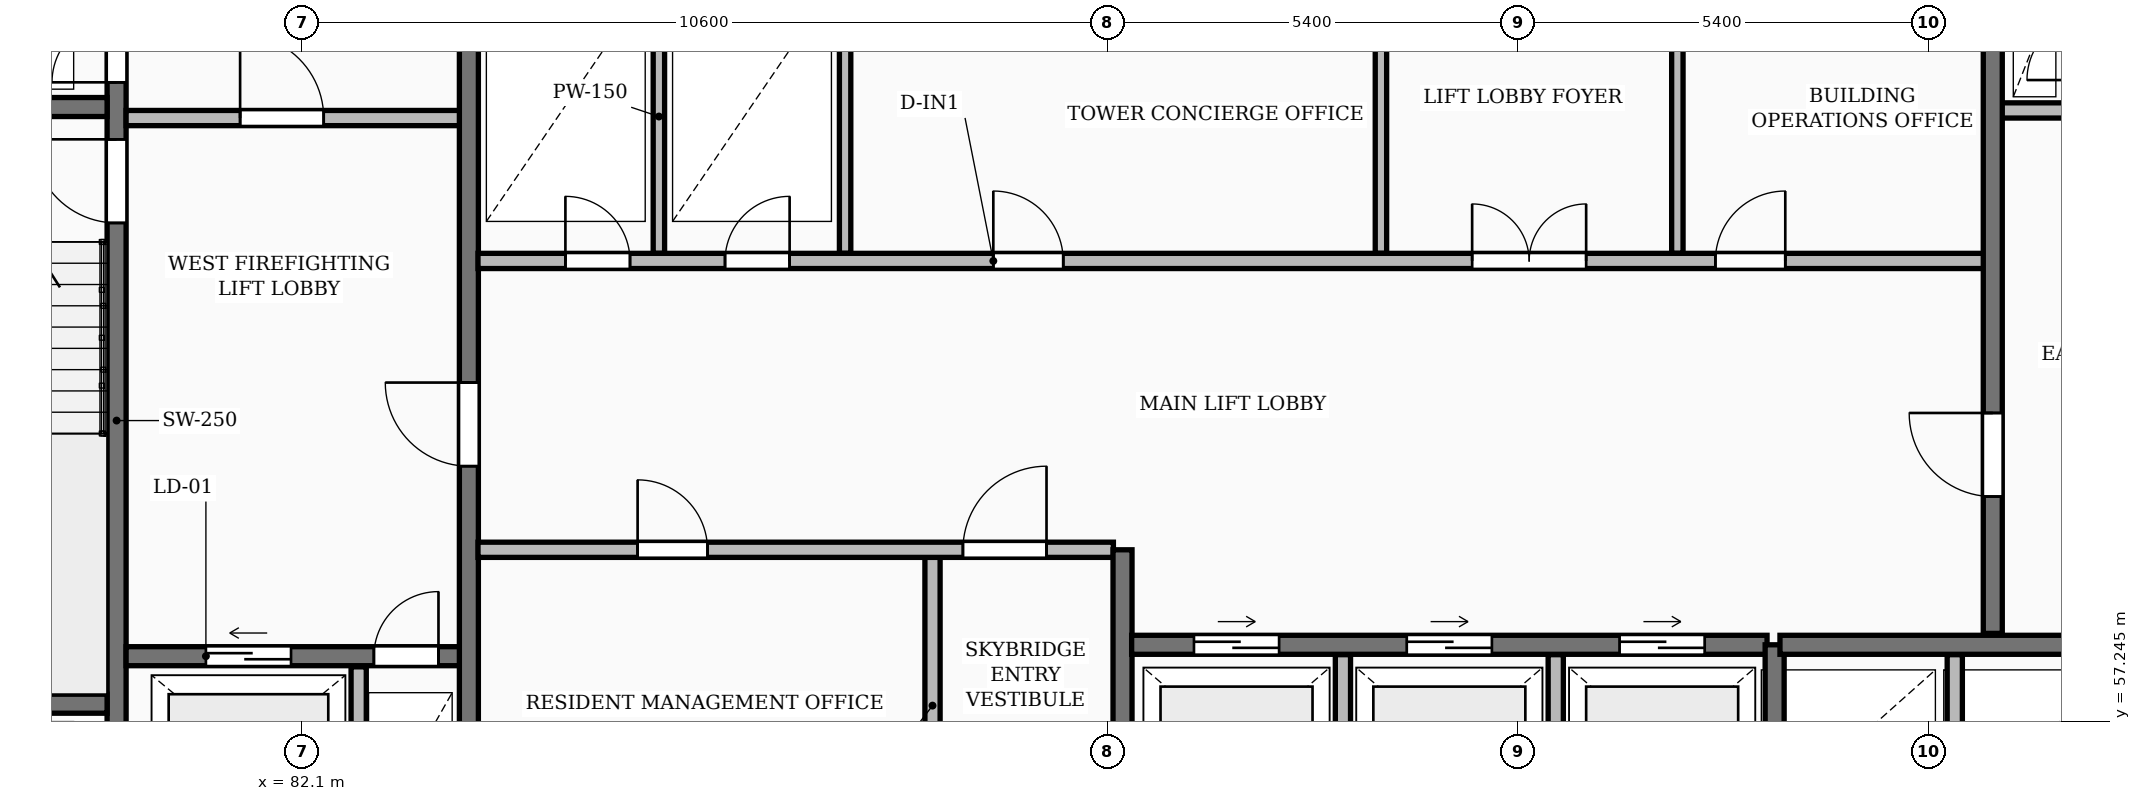
"""IFC4 building model, lengths in metres.
Left out: names, types, materials, properties, quantities, classifications, styles, units other than length and angle.
Written with IfcOpenShell. Run it as: python <this file> out.ifc"""

import sys

from ifc_helpers import new_model, si_unit, direction, frame, frame_2d, origin, place, context, subcontext, project, spatial, rectangle, extrude, element, fill, save


model = new_model("IFC4")
c1 = context("Model", 3, precision=1e-05, world=origin(), true_north=direction((0.0, 1.0)))
c2 = subcontext(c1, "Body", "Model", "MODEL_VIEW")
j1 = project(units=[si_unit("LENGTHUNIT", "METRE"), si_unit("PLANEANGLEUNIT", "RADIAN")], contexts=[c1])
p1 = place(None, origin())
s1 = spatial("IfcSite", under=j1, at=p1, CompositionType="ELEMENT")
p2 = place(p1, origin())
s2 = spatial("IfcBuilding", under=s1, at=p2, CompositionType="ELEMENT")
p3 = place(p2, frame((0.0, 0.0, 146.5)))
s3 = spatial("IfcBuildingStorey", under=s2, at=p3, CompositionType="ELEMENT", Elevation=146.5)
p4 = place(p3, frame((79.665, 55.4, 0.0), z_axis=(0.0, 0.0, 1.0), x_axis=(0.0, 1.0, 0.0)))
e1 = element("IfcWall", 1, at=p4, inside=s3, PredefinedType="SHEAR", context=c2, shape_type="SweptSolid", body=[
    extrude(rectangle(XDim=11.6, YDim=0.25, at=frame_2d((5.8, 0.0))), origin(), (0.0, 0.0, 1.0), 3.6),
])
p5 = place(p4, frame((0.55, 0.0, 0.0)))
e2 = element("IfcOpeningElement", 2, at=p5, cuts=e1, PredefinedType="OPENING", context=c2, shape_type="SweptSolid", body=[
    extrude(rectangle(XDim=0.85, YDim=2.05, at=frame_2d((0.425, 1.025))), frame((0.0, 0.135, 0.0), z_axis=(0.0, -1.0, 0.0), x_axis=(1.0, 0.0, 0.0)), (0.0, 0.0, 1.0), 0.27),
])
p6 = place(p4, frame((8.4, 0.0, 0.0)))
e3 = element("IfcOpeningElement", 3, at=p6, cuts=e1, PredefinedType="OPENING", context=c2, shape_type="SweptSolid", body=[
    extrude(rectangle(XDim=1.1, YDim=2.1, at=frame_2d((0.55, 1.05))), frame((0.0, 0.135, 0.0), z_axis=(0.0, -1.0, 0.0), x_axis=(1.0, 0.0, 0.0)), (0.0, 0.0, 1.0), 0.27),
])
p7 = place(p4, frame((10.25, 0.0, 0.0)))
e4 = element("IfcOpeningElement", 4, at=p7, cuts=e1, PredefinedType="OPENING", context=c2, shape_type="SweptSolid", body=[
    extrude(rectangle(XDim=0.85, YDim=2.05, at=frame_2d((0.425, 1.025))), frame((0.0, 0.135, 0.0), z_axis=(0.0, -1.0, 0.0), x_axis=(1.0, 0.0, 0.0)), (0.0, 0.0, 1.0), 0.27),
])
for number, where, z_axis, x_axis in (
    (5, (76.3, 57.475, 0.0), (0.0, 0.0, 1.0), (1.0, 0.0, 0.0)),
    (6, (76.3, 65.325, 0.0), (0.0, 0.0, 1.0), (1.0, 0.0, 0.0)),
):
    element("IfcWall", number, at=place(p3, frame(where, z_axis=z_axis, x_axis=x_axis)), inside=s3, PredefinedType="SHEAR", context=c2, shape_type="SweptSolid", body=[
        extrude(rectangle(XDim=3.24, YDim=0.25, at=frame_2d((1.62, 0.0))), origin(), (0.0, 0.0, 1.0), 3.6),
    ])
p8 = place(p3, frame((79.79, 58.1, 0.0), z_axis=(0.0, 0.0, 1.0), x_axis=(1.0, 0.0, 0.0)))
e7 = element("IfcWall", 7, at=p8, inside=s3, PredefinedType="SHEAR", context=c2, shape_type="SweptSolid", body=[
    extrude(rectangle(XDim=4.39, YDim=0.25, at=frame_2d((2.195, 0.0))), origin(), (0.0, 0.0, 1.0), 3.6),
])
p9 = place(p8, frame((1.05, 0.0, 0.0)))
e8 = element("IfcOpeningElement", 8, at=p9, cuts=e7, PredefinedType="OPENING", context=c2, shape_type="SweptSolid", body=[
    extrude(rectangle(XDim=1.12, YDim=2.12, at=frame_2d((0.56, 1.06))), frame((0.0, 0.135, 0.0), z_axis=(0.0, -1.0, 0.0), x_axis=(1.0, 0.0, 0.0)), (0.0, 0.0, 1.0), 0.27),
])
p10 = place(p8, frame((3.26, 0.0, 0.0)))
e9 = element("IfcOpeningElement", 9, at=p10, cuts=e7, PredefinedType="OPENING", context=c2, shape_type="SweptSolid", body=[
    extrude(rectangle(XDim=0.85, YDim=2.05, at=frame_2d((0.425, 1.025))), frame((0.0, 0.135, 0.0), z_axis=(0.0, -1.0, 0.0), x_axis=(1.0, 0.0, 0.0)), (0.0, 0.0, 1.0), 0.27),
])
p11 = place(p3, frame((82.85, 55.4, 0.0), z_axis=(0.0, 0.0, 1.0), x_axis=(0.0, 1.0, 0.0)))
e10 = element("IfcWall", 10, at=p11, inside=s3, PredefinedType="PARTITIONING", context=c2, shape_type="SweptSolid", body=[
    extrude(rectangle(XDim=2.56, YDim=0.2, at=frame_2d((1.28, 0.0))), origin(), (0.0, 0.0, 1.0), 3.31),
])
p12 = place(p3, frame((79.79, 65.18, 0.0), z_axis=(0.0, 0.0, 1.0), x_axis=(1.0, 0.0, 0.0)))
e11 = element("IfcWall", 11, at=p12, inside=s3, PredefinedType="PARTITIONING", context=c2, shape_type="SweptSolid", body=[
    extrude(rectangle(XDim=4.39, YDim=0.2, at=frame_2d((2.195, 0.0))), origin(), (0.0, 0.0, 1.0), 3.31),
])
p13 = place(p12, frame((1.5, 0.0, 0.0)))
e12 = element("IfcOpeningElement", 12, at=p13, cuts=e11, PredefinedType="OPENING", context=c2, shape_type="SweptSolid", body=[
    extrude(rectangle(XDim=1.1, YDim=2.1, at=frame_2d((0.55, 1.05))), frame((0.0, 0.11, 0.0), z_axis=(0.0, -1.0, 0.0), x_axis=(1.0, 0.0, 0.0)), (0.0, 0.0, 1.0), 0.22),
])
p14 = place(p3, frame((84.3, 55.4, 0.0), z_axis=(0.0, 0.0, 1.0), x_axis=(0.0, 1.0, 0.0)))
e13 = element("IfcWall", 13, at=p14, inside=s3, PredefinedType="SHEAR", context=c2, shape_type="SweptSolid", body=[
    extrude(rectangle(XDim=11.6, YDim=0.25, at=frame_2d((5.8, 0.0))), origin(), (0.0, 0.0, 1.0), 3.6),
])
p15 = place(p14, frame((5.2, 0.0, 0.0)))
e14 = element("IfcOpeningElement", 14, at=p15, cuts=e13, PredefinedType="OPENING", context=c2, shape_type="SweptSolid", body=[
    extrude(rectangle(XDim=1.1, YDim=2.1, at=frame_2d((0.55, 1.05))), frame((0.0, 0.135, 0.0), z_axis=(0.0, -1.0, 0.0), x_axis=(1.0, 0.0, 0.0)), (0.0, 0.0, 1.0), 0.27),
])
p16 = place(p3, frame((90.4, 55.4, 0.0), z_axis=(0.0, 0.0, 1.0), x_axis=(0.0, 1.0, 0.0)))
e15 = element("IfcWall", 15, at=p16, inside=s3, PredefinedType="PARTITIONING", context=c2, shape_type="SweptSolid", body=[
    extrude(rectangle(XDim=4.1, YDim=0.2, at=frame_2d((2.05, 0.0))), origin(), (0.0, 0.0, 1.0), 3.31),
])
p17 = place(p3, frame((84.42, 59.5, 0.0), z_axis=(0.0, 0.0, 1.0), x_axis=(1.0, 0.0, 0.0)))
e16 = element("IfcWall", 16, at=p17, inside=s3, PredefinedType="PARTITIONING", context=c2, shape_type="SweptSolid", body=[
    extrude(rectangle(XDim=8.36, YDim=0.2, at=frame_2d((4.18, 0.0))), origin(), (0.0, 0.0, 1.0), 3.31),
])
p18 = place(p17, frame((2.1, 0.0, 0.0)))
e17 = element("IfcOpeningElement", 17, at=p18, cuts=e16, PredefinedType="OPENING", context=c2, shape_type="SweptSolid", body=[
    extrude(rectangle(XDim=0.92, YDim=2.08, at=frame_2d((0.46, 1.04))), frame((0.0, 0.11, 0.0), z_axis=(0.0, -1.0, 0.0), x_axis=(1.0, 0.0, 0.0)), (0.0, 0.0, 1.0), 0.22),
])
p19 = place(p17, frame((6.38, 0.0, 0.0)))
e18 = element("IfcOpeningElement", 18, at=p19, cuts=e16, PredefinedType="OPENING", context=c2, shape_type="SweptSolid", body=[
    extrude(rectangle(XDim=1.1, YDim=2.1, at=frame_2d((0.55, 1.05))), frame((0.0, 0.11, 0.0), z_axis=(0.0, -1.0, 0.0), x_axis=(1.0, 0.0, 0.0)), (0.0, 0.0, 1.0), 0.22),
])
p20 = place(p3, frame((92.9, 55.4, 0.0), z_axis=(0.0, 0.0, 1.0), x_axis=(0.0, 1.0, 0.0)))
e19 = element("IfcWall", 19, at=p20, inside=s3, PredefinedType="SHEAR", context=c2, shape_type="SweptSolid", body=[
    extrude(rectangle(XDim=4.1, YDim=0.25, at=frame_2d((2.05, 0.0))), origin(), (0.0, 0.0, 1.0), 3.6),
])
for number, where, z_axis, x_axis in (
    (20, (95.8, 55.4, 0.0), (0.0, 0.0, 1.0), (0.0, 1.0, 0.0)),
    (21, (98.6, 55.4, 0.0), (0.0, 0.0, 1.0), (0.0, 1.0, 0.0)),
):
    element("IfcWall", number, at=place(p3, frame(where, z_axis=z_axis, x_axis=x_axis)), inside=s3, PredefinedType="PARTITIONING", context=c2, shape_type="SweptSolid", body=[
        extrude(rectangle(XDim=2.72, YDim=0.2, at=frame_2d((1.36, 0.0))), origin(), (0.0, 0.0, 1.0), 3.31),
    ])
p21 = place(p3, frame((93.02, 58.25, 0.0), z_axis=(0.0, 0.0, 1.0), x_axis=(1.0, 0.0, 0.0)))
e22 = element("IfcWall", 22, at=p21, inside=s3, PredefinedType="SHEAR", context=c2, shape_type="SweptSolid", body=[
    extrude(rectangle(XDim=8.36, YDim=0.25, at=frame_2d((4.18, 0.0))), origin(), (0.0, 0.0, 1.0), 3.6),
])
p22 = place(p21, frame((0.82, 0.0, 0.0)))
e23 = element("IfcOpeningElement", 23, at=p22, cuts=e22, PredefinedType="OPENING", context=c2, shape_type="SweptSolid", body=[
    extrude(rectangle(XDim=1.12, YDim=2.12, at=frame_2d((0.56, 1.06))), frame((0.0, 0.135, 0.0), z_axis=(0.0, -1.0, 0.0), x_axis=(1.0, 0.0, 0.0)), (0.0, 0.0, 1.0), 0.27),
])
p23 = place(p21, frame((3.62, 0.0, 0.0)))
e24 = element("IfcOpeningElement", 24, at=p23, cuts=e22, PredefinedType="OPENING", context=c2, shape_type="SweptSolid", body=[
    extrude(rectangle(XDim=1.12, YDim=2.12, at=frame_2d((0.56, 1.06))), frame((0.0, 0.135, 0.0), z_axis=(0.0, -1.0, 0.0), x_axis=(1.0, 0.0, 0.0)), (0.0, 0.0, 1.0), 0.27),
])
p24 = place(p21, frame((6.42, 0.0, 0.0)))
e25 = element("IfcOpeningElement", 25, at=p24, cuts=e22, PredefinedType="OPENING", context=c2, shape_type="SweptSolid", body=[
    extrude(rectangle(XDim=1.12, YDim=2.12, at=frame_2d((0.56, 1.06))), frame((0.0, 0.135, 0.0), z_axis=(0.0, -1.0, 0.0), x_axis=(1.0, 0.0, 0.0)), (0.0, 0.0, 1.0), 0.27),
])
p25 = place(p3, frame((101.48, 55.4, 0.0), z_axis=(0.0, 0.0, 1.0), x_axis=(0.0, 1.0, 0.0)))
e26 = element("IfcWall", 26, at=p25, inside=s3, PredefinedType="SHEAR", context=c2, shape_type="SweptSolid", body=[
    extrude(rectangle(XDim=2.85, YDim=0.25, at=frame_2d((1.425, 0.0))), origin(), (0.0, 0.0, 1.0), 3.6),
])
p26 = place(p3, frame((103.85, 55.4, 0.0), z_axis=(0.0, 0.0, 1.0), x_axis=(0.0, 1.0, 0.0)))
e27 = element("IfcWall", 27, at=p26, inside=s3, PredefinedType="PARTITIONING", context=c2, shape_type="SweptSolid", body=[
    extrude(rectangle(XDim=2.72, YDim=0.2, at=frame_2d((1.36, 0.0))), origin(), (0.0, 0.0, 1.0), 3.31),
])
p27 = place(p3, frame((101.55, 58.25, 0.0), z_axis=(0.0, 0.0, 1.0), x_axis=(1.0, 0.0, 0.0)))
e28 = element("IfcWall", 28, at=p27, inside=s3, PredefinedType="SHEAR", context=c2, shape_type="SweptSolid", body=[
    extrude(rectangle(XDim=4.6, YDim=0.25, at=frame_2d((2.3, 0.0))), origin(), (0.0, 0.0, 1.0), 3.6),
])
for number, where, z_axis, x_axis in (
    (29, (86.8, 63.4, 0.0), (0.0, 0.0, 1.0), (0.0, 1.0, 0.0)),
    (30, (89.25, 63.4, 0.0), (0.0, 0.0, 1.0), (0.0, 1.0, 0.0)),
    (31, (96.3, 63.4, 0.0), (0.0, 0.0, 1.0), (0.0, 1.0, 0.0)),
    (32, (100.2, 63.4, 0.0), (0.0, 0.0, 1.0), (0.0, 1.0, 0.0)),
):
    element("IfcWall", number, at=place(p3, frame(where, z_axis=z_axis, x_axis=x_axis)), inside=s3, PredefinedType="PARTITIONING", context=c2, shape_type="SweptSolid", body=[
        extrude(rectangle(XDim=3.6, YDim=0.15, at=frame_2d((1.8, 0.0))), origin(), (0.0, 0.0, 1.0), 3.31),
    ])
p28 = place(p3, frame((84.42, 63.3, 0.0), z_axis=(0.0, 0.0, 1.0), x_axis=(1.0, 0.0, 0.0)))
e33 = element("IfcWall", 33, at=p28, inside=s3, PredefinedType="PARTITIONING", context=c2, shape_type="SweptSolid", body=[
    extrude(rectangle(XDim=19.83, YDim=0.2, at=frame_2d((9.915, 0.0))), origin(), (0.0, 0.0, 1.0), 3.31),
])
p29 = place(p28, frame((1.15, 0.0, 0.0)))
e34 = element("IfcOpeningElement", 34, at=p29, cuts=e33, PredefinedType="OPENING", context=c2, shape_type="SweptSolid", body=[
    extrude(rectangle(XDim=0.85, YDim=2.05, at=frame_2d((0.425, 1.025))), frame((0.0, 0.11, 0.0), z_axis=(0.0, -1.0, 0.0), x_axis=(1.0, 0.0, 0.0)), (0.0, 0.0, 1.0), 0.22),
])
p30 = place(p28, frame((3.25, 0.0, 0.0)))
e35 = element("IfcOpeningElement", 35, at=p30, cuts=e33, PredefinedType="OPENING", context=c2, shape_type="SweptSolid", body=[
    extrude(rectangle(XDim=0.85, YDim=2.05, at=frame_2d((0.425, 1.025))), frame((0.0, 0.11, 0.0), z_axis=(0.0, -1.0, 0.0), x_axis=(1.0, 0.0, 0.0)), (0.0, 0.0, 1.0), 0.22),
])
p31 = place(p28, frame((13.08, 0.0, 0.0)))
e36 = element("IfcOpeningElement", 36, at=p31, cuts=e33, PredefinedType="OPENING", context=c2, shape_type="SweptSolid", body=[
    extrude(rectangle(XDim=1.5, YDim=2.2, at=frame_2d((0.75, 1.1))), frame((0.0, 0.11, 0.0), z_axis=(0.0, -1.0, 0.0), x_axis=(1.0, 0.0, 0.0)), (0.0, 0.0, 1.0), 0.22),
])
p32 = place(p28, frame((6.78, 0.0, 0.0)))
e37 = element("IfcOpeningElement", 37, at=p32, cuts=e33, PredefinedType="OPENING", context=c2, shape_type="SweptSolid", body=[
    extrude(rectangle(XDim=0.92, YDim=2.08, at=frame_2d((0.46, 1.04))), frame((0.0, 0.11, 0.0), z_axis=(0.0, -1.0, 0.0), x_axis=(1.0, 0.0, 0.0)), (0.0, 0.0, 1.0), 0.22),
])
p33 = place(p28, frame((16.28, 0.0, 0.0)))
e38 = element("IfcOpeningElement", 38, at=p33, cuts=e33, PredefinedType="OPENING", context=c2, shape_type="SweptSolid", body=[
    extrude(rectangle(XDim=0.92, YDim=2.08, at=frame_2d((0.46, 1.04))), frame((0.0, 0.11, 0.0), z_axis=(0.0, -1.0, 0.0), x_axis=(1.0, 0.0, 0.0)), (0.0, 0.0, 1.0), 0.22),
])
p34 = place(p3, frame((104.45, 65.28, 0.0), z_axis=(0.0, 0.0, 1.0), x_axis=(1.0, 0.0, 0.0)))
e39 = element("IfcWall", 39, at=p34, inside=s3, PredefinedType="PARTITIONING", context=c2, shape_type="SweptSolid", body=[
    extrude(rectangle(XDim=1.2, YDim=0.2, at=frame_2d((0.6, 0.0))), origin(), (0.0, 0.0, 1.0), 3.31),
])
p35 = place(p3, frame((104.35, 58.4, 0.0), z_axis=(0.0, 0.0, 1.0), x_axis=(0.0, 1.0, 0.0)))
e40 = element("IfcWall", 40, at=p35, inside=s3, PredefinedType="SHEAR", context=c2, shape_type="SweptSolid", body=[
    extrude(rectangle(XDim=8.6, YDim=0.25, at=frame_2d((4.3, 0.0))), origin(), (0.0, 0.0, 1.0), 3.6),
])
p36 = place(p35, frame((1.8, 0.0, 0.0)))
e41 = element("IfcOpeningElement", 41, at=p36, cuts=e40, PredefinedType="OPENING", context=c2, shape_type="SweptSolid", body=[
    extrude(rectangle(XDim=1.1, YDim=2.1, at=frame_2d((0.55, 1.05))), frame((0.0, 0.135, 0.0), z_axis=(0.0, -1.0, 0.0), x_axis=(1.0, 0.0, 0.0)), (0.0, 0.0, 1.0), 0.27),
])
p37 = place(p6, origin())
e42 = element("IfcDoor", 42, at=p37, inside=s3, OperationType="SINGLE_SWING_RIGHT", PredefinedType="DOOR", context=c2, shape_type="SweptSolid", body=[
    extrude(rectangle(XDim=1.1, YDim=2.1, at=frame_2d((0.55, 1.05))), frame((0.0, 0.025, 0.0), z_axis=(0.0, -1.0, 0.0), x_axis=(1.0, 0.0, 0.0)), (0.0, 0.0, 1.0), 0.05),
])
fill(e3, e42)
p38 = place(p7, origin())
e43 = element("IfcDoor", 43, at=p38, inside=s3, OperationType="SINGLE_SWING_LEFT", PredefinedType="DOOR", context=c2, shape_type="SweptSolid", body=[
    extrude(rectangle(XDim=0.85, YDim=2.05, at=frame_2d((0.425, 1.025))), frame((0.0, 0.025, 0.0), z_axis=(0.0, -1.0, 0.0), x_axis=(1.0, 0.0, 0.0)), (0.0, 0.0, 1.0), 0.05),
])
fill(e4, e43)
p39 = place(p9, origin())
e44 = element("IfcDoor", 44, at=p39, inside=s3, OperationType="SLIDING_TO_LEFT", PredefinedType="DOOR", context=c2, shape_type="SweptSolid", body=[
    extrude(rectangle(XDim=1.12, YDim=2.12, at=frame_2d((0.56, 1.06))), frame((0.0, 0.025, 0.0), z_axis=(0.0, -1.0, 0.0), x_axis=(1.0, 0.0, 0.0)), (0.0, 0.0, 1.0), 0.05),
])
fill(e8, e44)
p40 = place(p10, origin())
e45 = element("IfcDoor", 45, at=p40, inside=s3, OperationType="SINGLE_SWING_RIGHT", PredefinedType="DOOR", context=c2, shape_type="SweptSolid", body=[
    extrude(rectangle(XDim=0.85, YDim=2.05, at=frame_2d((0.425, 1.025))), frame((0.0, 0.025, 0.0), z_axis=(0.0, -1.0, 0.0), x_axis=(1.0, 0.0, 0.0)), (0.0, 0.0, 1.0), 0.05),
])
fill(e9, e45)
p41 = place(p13, origin())
e46 = element("IfcDoor", 46, at=p41, inside=s3, OperationType="SINGLE_SWING_LEFT", PredefinedType="DOOR", context=c2, shape_type="SweptSolid", body=[
    extrude(rectangle(XDim=1.1, YDim=2.1, at=frame_2d((0.55, 1.05))), frame((0.0, 0.025, 0.0), z_axis=(0.0, -1.0, 0.0), x_axis=(1.0, 0.0, 0.0)), (0.0, 0.0, 1.0), 0.05),
])
fill(e12, e46)
p42 = place(p15, origin())
e47 = element("IfcDoor", 47, at=p42, inside=s3, OperationType="SINGLE_SWING_RIGHT", PredefinedType="DOOR", context=c2, shape_type="SweptSolid", body=[
    extrude(rectangle(XDim=1.1, YDim=2.1, at=frame_2d((0.55, 1.05))), frame((0.0, 0.025, 0.0), z_axis=(0.0, -1.0, 0.0), x_axis=(1.0, 0.0, 0.0)), (0.0, 0.0, 1.0), 0.05),
])
fill(e14, e47)
p43 = place(p18, origin())
e48 = element("IfcDoor", 48, at=p43, inside=s3, OperationType="SINGLE_SWING_LEFT", PredefinedType="DOOR", context=c2, shape_type="SweptSolid", body=[
    extrude(rectangle(XDim=0.92, YDim=2.08, at=frame_2d((0.46, 1.04))), frame((0.0, 0.025, 0.0), z_axis=(0.0, -1.0, 0.0), x_axis=(1.0, 0.0, 0.0)), (0.0, 0.0, 1.0), 0.05),
])
fill(e17, e48)
p44 = place(p19, origin())
e49 = element("IfcDoor", 49, at=p44, inside=s3, OperationType="SINGLE_SWING_RIGHT", PredefinedType="DOOR", context=c2, shape_type="SweptSolid", body=[
    extrude(rectangle(XDim=1.1, YDim=2.1, at=frame_2d((0.55, 1.05))), frame((0.0, 0.025, 0.0), z_axis=(0.0, -1.0, 0.0), x_axis=(1.0, 0.0, 0.0)), (0.0, 0.0, 1.0), 0.05),
])
fill(e18, e49)
p45 = place(p22, origin())
e50 = element("IfcDoor", 50, at=p45, inside=s3, OperationType="SLIDING_TO_RIGHT", PredefinedType="DOOR", context=c2, shape_type="SweptSolid", body=[
    extrude(rectangle(XDim=1.12, YDim=2.12, at=frame_2d((0.56, 1.06))), frame((0.0, 0.025, 0.0), z_axis=(0.0, -1.0, 0.0), x_axis=(1.0, 0.0, 0.0)), (0.0, 0.0, 1.0), 0.05),
])
fill(e23, e50)
p46 = place(p23, origin())
e51 = element("IfcDoor", 51, at=p46, inside=s3, OperationType="SLIDING_TO_RIGHT", PredefinedType="DOOR", context=c2, shape_type="SweptSolid", body=[
    extrude(rectangle(XDim=1.12, YDim=2.12, at=frame_2d((0.56, 1.06))), frame((0.0, 0.025, 0.0), z_axis=(0.0, -1.0, 0.0), x_axis=(1.0, 0.0, 0.0)), (0.0, 0.0, 1.0), 0.05),
])
fill(e24, e51)
p47 = place(p24, origin())
e52 = element("IfcDoor", 52, at=p47, inside=s3, OperationType="SLIDING_TO_RIGHT", PredefinedType="DOOR", context=c2, shape_type="SweptSolid", body=[
    extrude(rectangle(XDim=1.12, YDim=2.12, at=frame_2d((0.56, 1.06))), frame((0.0, 0.025, 0.0), z_axis=(0.0, -1.0, 0.0), x_axis=(1.0, 0.0, 0.0)), (0.0, 0.0, 1.0), 0.05),
])
fill(e25, e52)
p48 = place(p29, origin())
e53 = element("IfcDoor", 53, at=p48, inside=s3, OperationType="SINGLE_SWING_LEFT", PredefinedType="DOOR", context=c2, shape_type="SweptSolid", body=[
    extrude(rectangle(XDim=0.85, YDim=2.05, at=frame_2d((0.425, 1.025))), frame((0.0, 0.025, 0.0), z_axis=(0.0, -1.0, 0.0), x_axis=(1.0, 0.0, 0.0)), (0.0, 0.0, 1.0), 0.05),
])
fill(e34, e53)
p49 = place(p30, origin())
e54 = element("IfcDoor", 54, at=p49, inside=s3, OperationType="SINGLE_SWING_RIGHT", PredefinedType="DOOR", context=c2, shape_type="SweptSolid", body=[
    extrude(rectangle(XDim=0.85, YDim=2.05, at=frame_2d((0.425, 1.025))), frame((0.0, 0.025, 0.0), z_axis=(0.0, -1.0, 0.0), x_axis=(1.0, 0.0, 0.0)), (0.0, 0.0, 1.0), 0.05),
])
fill(e35, e54)
p50 = place(p31, origin())
e55 = element("IfcDoor", 55, at=p50, inside=s3, OperationType="DOUBLE_DOOR_SINGLE_SWING", PredefinedType="DOOR", context=c2, shape_type="SweptSolid", body=[
    extrude(rectangle(XDim=1.5, YDim=2.2, at=frame_2d((0.75, 1.1))), frame((0.0, 0.025, 0.0), z_axis=(0.0, -1.0, 0.0), x_axis=(1.0, 0.0, 0.0)), (0.0, 0.0, 1.0), 0.05),
])
fill(e36, e55)
p51 = place(p32, origin())
e56 = element("IfcDoor", 56, at=p51, inside=s3, OperationType="SINGLE_SWING_LEFT", PredefinedType="DOOR", context=c2, shape_type="SweptSolid", body=[
    extrude(rectangle(XDim=0.92, YDim=2.08, at=frame_2d((0.46, 1.04))), frame((0.0, 0.025, 0.0), z_axis=(0.0, -1.0, 0.0), x_axis=(1.0, 0.0, 0.0)), (0.0, 0.0, 1.0), 0.05),
])
fill(e37, e56)
p52 = place(p33, origin())
e57 = element("IfcDoor", 57, at=p52, inside=s3, OperationType="SINGLE_SWING_RIGHT", PredefinedType="DOOR", context=c2, shape_type="SweptSolid", body=[
    extrude(rectangle(XDim=0.92, YDim=2.08, at=frame_2d((0.46, 1.04))), frame((0.0, 0.025, 0.0), z_axis=(0.0, -1.0, 0.0), x_axis=(1.0, 0.0, 0.0)), (0.0, 0.0, 1.0), 0.05),
])
fill(e38, e57)
p53 = place(p36, origin())
e58 = element("IfcDoor", 58, at=p53, inside=s3, OperationType="SINGLE_SWING_RIGHT", PredefinedType="DOOR", context=c2, shape_type="SweptSolid", body=[
    extrude(rectangle(XDim=1.1, YDim=2.1, at=frame_2d((0.55, 1.05))), frame((0.0, 0.025, 0.0), z_axis=(0.0, -1.0, 0.0), x_axis=(1.0, 0.0, 0.0)), (0.0, 0.0, 1.0), 0.05),
])
fill(e41, e58)
save(model, sys.argv[1])
